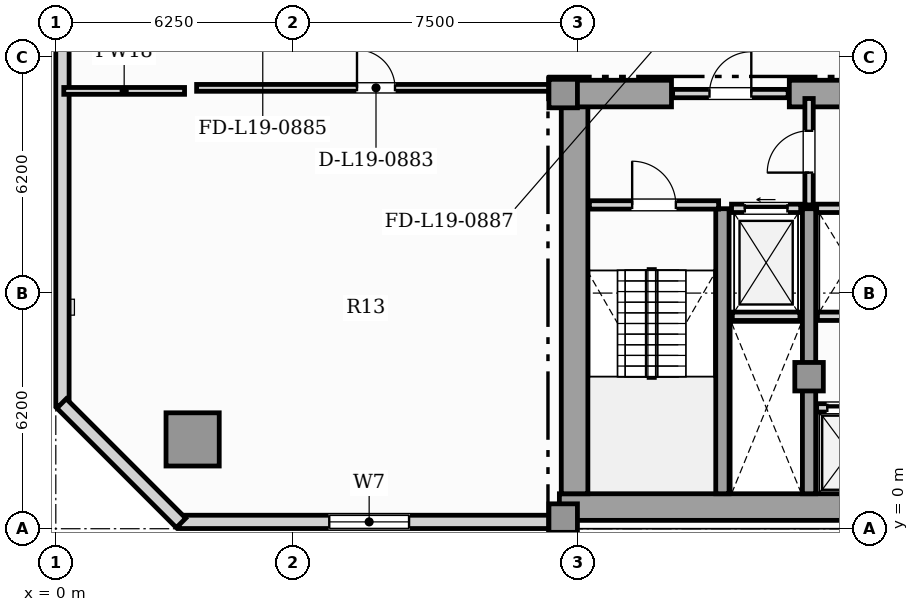
"""IFC4 building model, lengths in metres.
Left out: names, types, materials, properties, quantities, classifications, styles, units other than length and angle.
Written with IfcOpenShell. Run it as: python <this file> out.ifc"""

import sys

from ifc_helpers import new_model, si_unit, direction, frame, frame_2d, origin, origin_2d, place, context, subcontext, project, spatial, rectangle, hollow_rectangle, extrude, element, fill, save


model = new_model("IFC4")
c1 = context("Model", 3, precision=1e-05, world=origin(), true_north=direction((0.0, 1.0)))
c2 = subcontext(c1, "Body", "Model", "MODEL_VIEW")
j1 = project(units=[si_unit("LENGTHUNIT", "METRE"), si_unit("PLANEANGLEUNIT", "RADIAN")], contexts=[c1])
p1 = place(None, origin())
s1 = spatial("IfcSite", under=j1, at=p1, CompositionType="ELEMENT")
p2 = place(p1, origin())
s2 = spatial("IfcBuilding", under=s1, at=p2, CompositionType="ELEMENT")
p3 = place(p2, frame((0.0, 0.0, 81.05)))
s3 = spatial("IfcBuildingStorey", under=s2, at=p3, CompositionType="ELEMENT", Elevation=81.05)
p4 = place(p3, frame((13.25, 0.57, 0.0), z_axis=(0.0, 0.0, 1.0), x_axis=(1.0, 0.0, 0.0)))
e1 = element("IfcWall", 1, at=p4, inside=s3, PredefinedType="SHEAR", context=c2, shape_type="SweptSolid", body=[
    extrude(rectangle(XDim=31.0, YDim=0.7, at=frame_2d((15.5, 0.0))), origin(), (0.0, 0.0, 1.0), 3.6),
])
p5 = place(p3, frame((13.65, 0.92, 0.0), z_axis=(0.0, 0.0, 1.0), x_axis=(0.0, 1.0, 0.0)))
e2 = element("IfcWall", 2, at=p5, inside=s3, PredefinedType="SHEAR", context=c2, shape_type="SweptSolid", body=[
    extrude(rectangle(XDim=10.53, YDim=0.7, at=frame_2d((5.265, 0.0))), origin(), (0.0, 0.0, 1.0), 3.6),
])
p6 = place(p3, frame((13.25, 11.45, 0.0), z_axis=(0.0, 0.0, 1.0), x_axis=(1.0, 0.0, 0.0)))
e3 = element("IfcWall", 3, at=p6, inside=s3, PredefinedType="SHEAR", context=c2, shape_type="SweptSolid", body=[
    extrude(rectangle(XDim=2.95, YDim=0.7, at=frame_2d((1.475, 0.0))), origin(), (0.0, 0.0, 1.0), 3.6),
])
p7 = place(p3, frame((19.3, 11.45, 0.0), z_axis=(0.0, 0.0, 1.0), x_axis=(1.0, 0.0, 0.0)))
e4 = element("IfcWall", 4, at=p7, inside=s3, PredefinedType="SHEAR", context=c2, shape_type="SweptSolid", body=[
    extrude(rectangle(XDim=7.3, YDim=0.7, at=frame_2d((3.65, 0.0))), origin(), (0.0, 0.0, 1.0), 3.6),
])
for number, where, z_axis, x_axis in (
    (5, (17.54, 0.92, 0.0), (0.0, 0.0, 1.0), (0.0, 1.0, 0.0)),
    (6, (19.82, 0.92, 0.0), (0.0, 0.0, 1.0), (0.0, 1.0, 0.0)),
):
    element("IfcWall", number, at=place(p3, frame(where, z_axis=z_axis, x_axis=x_axis)), inside=s3, PredefinedType="SHEAR", context=c2, shape_type="SweptSolid", body=[
        extrude(rectangle(XDim=7.5, YDim=0.35, at=frame_2d((3.75, 0.0))), origin(), (0.0, 0.0, 1.0), 3.6),
    ])
for number, where, z_axis, x_axis in (
    (7, (13.35, 0.28, 0.0), (0.0, 0.0, 1.0), (1.0, 0.0, 0.0)),
    (8, (13.35, 11.45, 0.0), (0.0, 0.0, 1.0), (1.0, 0.0, 0.0)),
    (9, (19.82, 4.0, 0.0), (0.0, 0.0, 1.0), (1.0, 0.0, 0.0)),
):
    element("IfcColumn", number, at=place(p3, frame(where, z_axis=z_axis, x_axis=x_axis)), inside=s3, PredefinedType="COLUMN", context=c2, shape_type="SweptSolid", body=[
        extrude(rectangle(XDim=0.75, YDim=0.75, at=origin_2d()), origin(), (0.0, 0.0, 1.0), 3.85),
    ])
p8 = place(p3, frame((3.6, 2.35, 0.0), z_axis=(0.0, 0.0, 1.0), x_axis=(1.0, 0.0, 0.0)))
e10 = element("IfcColumn", 10, at=p8, inside=s3, PredefinedType="USERDEFINED", context=c2, shape_type="SweptSolid", body=[
    extrude(hollow_rectangle(XDim=1.4, YDim=1.4, WallThickness=0.08, at=origin_2d()), origin(), (0.0, 0.0, 1.0), 3.85),
])
p9 = place(p3, frame((3.24, 0.18, 0.0), z_axis=(0.0, 0.0, 1.0), x_axis=(1.0, 0.0, 0.0)))
e11 = element("IfcWall", 11, at=p9, inside=s3, PredefinedType="SOLIDWALL", context=c2, shape_type="SweptSolid", body=[
    extrude(rectangle(XDim=10.01, YDim=0.35, at=frame_2d((5.005, 0.0))), origin(), (0.0, 0.0, 1.0), 3.6),
])
p10 = place(p9, frame((3.955, 0.0, 0.85)))
e12 = element("IfcOpeningElement", 12, at=p10, cuts=e11, PredefinedType="OPENING", context=c2, shape_type="SweptSolid", body=[
    extrude(rectangle(XDim=2.1, YDim=2.05, at=frame_2d((1.05, 1.025))), frame((0.0, 0.185, 0.0), z_axis=(0.0, -1.0, 0.0), x_axis=(1.0, 0.0, 0.0)), (0.0, 0.0, 1.0), 0.37),
])
p11 = place(p3, frame((0.175, 43.16, 0.0), z_axis=(0.0, 0.0, 1.0), x_axis=(0.0, -1.0, 0.0)))
e13 = element("IfcWall", 13, at=p11, inside=s3, PredefinedType="SOLIDWALL", context=c2, shape_type="SweptSolid", body=[
    extrude(rectangle(XDim=39.92, YDim=0.35, at=frame_2d((19.96, 0.0))), origin(), (0.0, 0.0, 1.0), 3.6),
])
p12 = place(p11, frame((3.34, 0.0, 0.95)))
e14 = element("IfcOpeningElement", 14, at=p12, cuts=e13, PredefinedType="OPENING", context=c2, shape_type="SweptSolid", body=[
    extrude(rectangle(XDim=0.9, YDim=1.5, at=frame_2d((0.45, 0.75))), frame((0.0, 0.185, 0.0), z_axis=(0.0, -1.0, 0.0), x_axis=(1.0, 0.0, 0.0)), (0.0, 0.0, 1.0), 0.37),
])
p13 = place(p11, frame((23.517, 0.0, 0.9)))
e15 = element("IfcOpeningElement", 15, at=p13, cuts=e13, PredefinedType="OPENING", context=c2, shape_type="SweptSolid", body=[
    extrude(rectangle(XDim=1.5, YDim=1.95, at=frame_2d((0.75, 0.975))), frame((0.0, 0.185, 0.0), z_axis=(0.0, -1.0, 0.0), x_axis=(1.0, 0.0, 0.0)), (0.0, 0.0, 1.0), 0.37),
])
p14 = place(p11, frame((12.587, 0.0, 0.9)))
e16 = element("IfcOpeningElement", 16, at=p14, cuts=e13, PredefinedType="OPENING", context=c2, shape_type="SweptSolid", body=[
    extrude(rectangle(XDim=1.5, YDim=1.95, at=frame_2d((0.75, 0.975))), frame((0.0, 0.185, 0.0), z_axis=(0.0, -1.0, 0.0), x_axis=(1.0, 0.0, 0.0)), (0.0, 0.0, 1.0), 0.37),
])
p15 = place(p3, frame((0.152, 3.295, 0.0), z_axis=(0.0, 0.0, 1.0), x_axis=(0.707106781187, -0.707106781187, 0.0)))
e17 = element("IfcWall", 17, at=p15, inside=s3, PredefinedType="SOLIDWALL", context=c2, shape_type="SweptSolid", body=[
    extrude(rectangle(XDim=4.445, YDim=0.35, at=frame_2d((2.223, 0.0))), origin(), (0.0, 0.0, 1.0), 3.6),
])
p16 = place(p3, frame((17.8, 5.59, 0.0), z_axis=(0.0, 0.0, 1.0), x_axis=(1.0, 0.0, 0.0)))
e18 = element("IfcWall", 18, at=p16, inside=s3, PredefinedType="SOLIDWALL", context=c2, shape_type="SweptSolid", body=[
    extrude(rectangle(XDim=1.78, YDim=0.22, at=frame_2d((0.89, 0.0))), origin(), (0.0, 0.0, 1.0), 3.6),
])
p17 = place(p3, frame((17.78, 8.43, 0.0), z_axis=(0.0, 0.0, 1.0), x_axis=(1.0, 0.0, 0.0)))
e19 = element("IfcWall", 19, at=p17, inside=s3, PredefinedType="SOLIDWALL", context=c2, shape_type="SweptSolid", body=[
    extrude(rectangle(XDim=1.82, YDim=0.22, at=frame_2d((0.91, 0.0))), origin(), (0.0, 0.0, 1.0), 3.6),
])
p18 = place(p17, frame((0.35, 0.0, 0.0)))
e20 = element("IfcOpeningElement", 20, at=p18, cuts=e19, PredefinedType="OPENING", context=c2, shape_type="SweptSolid", body=[
    extrude(rectangle(XDim=1.12, YDim=2.25, at=frame_2d((0.56, 1.125))), frame((0.0, 0.12, 0.0), z_axis=(0.0, -1.0, 0.0), x_axis=(1.0, 0.0, 0.0)), (0.0, 0.0, 1.0), 0.24),
])
p19 = place(p3, frame((20.02, 3.18, 0.0), z_axis=(0.0, 0.0, 1.0), x_axis=(1.0, 0.0, 0.0)))
e21 = element("IfcWall", 21, at=p19, inside=s3, PredefinedType="SOLIDWALL", context=c2, shape_type="SweptSolid", body=[
    extrude(rectangle(XDim=1.74, YDim=0.22, at=frame_2d((0.87, 0.0))), origin(), (0.0, 0.0, 1.0), 3.6),
])
p20 = place(p19, frame((0.28, 0.0, 0.0)))
e22 = element("IfcOpeningElement", 22, at=p20, cuts=e21, PredefinedType="OPENING", context=c2, shape_type="SweptSolid", body=[
    extrude(rectangle(XDim=1.18, YDim=2.2, at=frame_2d((0.59, 1.1))), frame((0.0, 0.12, 0.0), z_axis=(0.0, -1.0, 0.0), x_axis=(1.0, 0.0, 0.0)), (0.0, 0.0, 1.0), 0.24),
])
p21 = place(p3, frame((20.04, 5.59, 0.0), z_axis=(0.0, 0.0, 1.0), x_axis=(1.0, 0.0, 0.0)))
e23 = element("IfcWall", 23, at=p21, inside=s3, PredefinedType="SOLIDWALL", context=c2, shape_type="SweptSolid", body=[
    extrude(rectangle(XDim=1.7, YDim=0.22, at=frame_2d((0.85, 0.0))), origin(), (0.0, 0.0, 1.0), 3.6),
])
p22 = place(p3, frame((20.02, 8.43, 0.0), z_axis=(0.0, 0.0, 1.0), x_axis=(1.0, 0.0, 0.0)))
e24 = element("IfcWall", 24, at=p22, inside=s3, PredefinedType="SOLIDWALL", context=c2, shape_type="SweptSolid", body=[
    extrude(rectangle(XDim=1.74, YDim=0.22, at=frame_2d((0.87, 0.0))), origin(), (0.0, 0.0, 1.0), 3.6),
])
p23 = place(p3, frame((14.04, 8.52, 0.0), z_axis=(0.0, 0.0, 1.0), x_axis=(1.0, 0.0, 0.0)))
e25 = element("IfcWall", 25, at=p23, inside=s3, PredefinedType="SOLIDWALL", context=c2, shape_type="SweptSolid", body=[
    extrude(rectangle(XDim=3.4, YDim=0.22, at=frame_2d((1.7, 0.0))), origin(), (0.0, 0.0, 1.0), 3.6),
])
p24 = place(p23, frame((1.125, 0.0, 0.0)))
e26 = element("IfcOpeningElement", 26, at=p24, cuts=e25, PredefinedType="OPENING", context=c2, shape_type="SweptSolid", body=[
    extrude(rectangle(XDim=1.15, YDim=2.2, at=frame_2d((0.575, 1.1))), frame((0.0, 0.12, 0.0), z_axis=(0.0, -1.0, 0.0), x_axis=(1.0, 0.0, 0.0)), (0.0, 0.0, 1.0), 0.24),
])
p25 = place(p3, frame((19.82, 8.52, 0.0), z_axis=(0.0, 0.0, 1.0), x_axis=(0.0, 1.0, 0.0)))
e27 = element("IfcWall", 27, at=p25, inside=s3, PredefinedType="SOLIDWALL", context=c2, shape_type="SweptSolid", body=[
    extrude(rectangle(XDim=2.8, YDim=0.22, at=frame_2d((1.4, 0.0))), origin(), (0.0, 0.0, 1.0), 3.055),
])
p26 = place(p25, frame((0.85, 0.0, 0.0)))
e28 = element("IfcOpeningElement", 28, at=p26, cuts=e27, PredefinedType="OPENING", context=c2, shape_type="SweptSolid", body=[
    extrude(rectangle(XDim=1.1, YDim=2.2, at=frame_2d((0.55, 1.1))), frame((0.0, 0.12, 0.0), z_axis=(0.0, -1.0, 0.0), x_axis=(1.0, 0.0, 0.0)), (0.0, 0.0, 1.0), 0.24),
])
p27 = place(p3, frame((16.23, 11.45, 0.0), z_axis=(0.0, 0.0, 1.0), x_axis=(1.0, 0.0, 0.0)))
e29 = element("IfcWall", 29, at=p27, inside=s3, PredefinedType="SOLIDWALL", context=c2, shape_type="SweptSolid", body=[
    extrude(rectangle(XDim=3.04, YDim=0.22, at=frame_2d((1.52, 0.0))), origin(), (0.0, 0.0, 1.0), 3.6),
])
p28 = place(p27, frame((0.97, 0.0, 0.0)))
e30 = element("IfcOpeningElement", 30, at=p28, cuts=e29, PredefinedType="OPENING", context=c2, shape_type="SweptSolid", body=[
    extrude(rectangle(XDim=1.1, YDim=2.2, at=frame_2d((0.55, 1.1))), frame((0.0, 0.12, 0.0), z_axis=(0.0, -1.0, 0.0), x_axis=(1.0, 0.0, 0.0)), (0.0, 0.0, 1.0), 0.24),
])
p29 = place(p3, frame((3.705, 11.6, 0.0), z_axis=(0.0, 0.0, 1.0), x_axis=(1.0, 0.0, 0.0)))
e31 = element("IfcWall", 31, at=p29, inside=s3, PredefinedType="PARTITIONING", context=c2, shape_type="SweptSolid", body=[
    extrude(rectangle(XDim=9.44, YDim=0.18, at=frame_2d((4.72, 0.0))), origin(), (0.0, 0.0, 1.0), 3.6),
])
p30 = place(p29, frame((4.22, 0.0, 0.0)))
e32 = element("IfcOpeningElement", 32, at=p30, cuts=e31, PredefinedType="OPENING", context=c2, shape_type="SweptSolid", body=[
    extrude(rectangle(XDim=1.0, YDim=2.15, at=frame_2d((0.5, 1.075))), frame((0.0, 0.1, 0.0), z_axis=(0.0, -1.0, 0.0), x_axis=(1.0, 0.0, 0.0)), (0.0, 0.0, 1.0), 0.2),
])
p31 = place(p3, frame((0.21, 11.52, 0.0), z_axis=(0.0, 0.0, 1.0), x_axis=(1.0, 0.0, 0.0)))
e33 = element("IfcWall", 33, at=p31, inside=s3, PredefinedType="PARTITIONING", context=c2, shape_type="SweptSolid", body=[
    extrude(rectangle(XDim=3.178, YDim=0.18, at=frame_2d((1.589, 0.0))), origin(), (0.0, 0.0, 1.0), 3.6),
])
p32 = place(p10, origin())
e34 = element("IfcWindow", 34, at=p32, inside=s3, PartitioningType="SINGLE_PANEL", PredefinedType="WINDOW", context=c2, shape_type="SweptSolid", body=[
    extrude(rectangle(XDim=2.1, YDim=2.05, at=frame_2d((1.05, 1.025))), frame((0.0, 0.03, 0.0), z_axis=(0.0, -1.0, 0.0), x_axis=(1.0, 0.0, 0.0)), (0.0, 0.0, 1.0), 0.06),
])
fill(e12, e34)
p33 = place(p18, origin())
e35 = element("IfcDoor", 35, at=p33, inside=s3, OperationType="SLIDING_TO_LEFT", PredefinedType="DOOR", context=c2, shape_type="SweptSolid", body=[
    extrude(rectangle(XDim=1.12, YDim=2.25, at=frame_2d((0.56, 1.125))), frame((0.0, 0.025, 0.0), z_axis=(0.0, -1.0, 0.0), x_axis=(1.0, 0.0, 0.0)), (0.0, 0.0, 1.0), 0.05),
])
fill(e20, e35)
p34 = place(p20, origin())
e36 = element("IfcDoor", 36, at=p34, inside=s3, OperationType="SLIDING_TO_RIGHT", PredefinedType="DOOR", context=c2, shape_type="SweptSolid", body=[
    extrude(rectangle(XDim=1.18, YDim=2.2, at=frame_2d((0.59, 1.1))), frame((0.0, 0.025, 0.0), z_axis=(0.0, -1.0, 0.0), x_axis=(1.0, 0.0, 0.0)), (0.0, 0.0, 1.0), 0.05),
])
fill(e22, e36)
p35 = place(p24, origin())
e37 = element("IfcDoor", 37, at=p35, inside=s3, OperationType="SINGLE_SWING_LEFT", PredefinedType="DOOR", context=c2, shape_type="SweptSolid", body=[
    extrude(rectangle(XDim=1.15, YDim=2.2, at=frame_2d((0.575, 1.1))), frame((0.0, 0.025, 0.0), z_axis=(0.0, -1.0, 0.0), x_axis=(1.0, 0.0, 0.0)), (0.0, 0.0, 1.0), 0.05),
])
fill(e26, e37)
p36 = place(p26, origin())
e38 = element("IfcDoor", 38, at=p36, inside=s3, OperationType="SINGLE_SWING_LEFT", PredefinedType="DOOR", context=c2, shape_type="SweptSolid", body=[
    extrude(rectangle(XDim=1.1, YDim=2.2, at=frame_2d((0.55, 1.1))), frame((0.0, 0.025, 0.0), z_axis=(0.0, -1.0, 0.0), x_axis=(1.0, 0.0, 0.0)), (0.0, 0.0, 1.0), 0.05),
])
fill(e28, e38)
p37 = place(p28, origin())
e39 = element("IfcDoor", 39, at=p37, inside=s3, OperationType="SINGLE_SWING_RIGHT", PredefinedType="DOOR", context=c2, shape_type="SweptSolid", body=[
    extrude(rectangle(XDim=1.1, YDim=2.2, at=frame_2d((0.55, 1.1))), frame((0.0, 0.025, 0.0), z_axis=(0.0, -1.0, 0.0), x_axis=(1.0, 0.0, 0.0)), (0.0, 0.0, 1.0), 0.05),
])
fill(e30, e39)
p38 = place(p30, origin())
e40 = element("IfcDoor", 40, at=p38, inside=s3, OperationType="SINGLE_SWING_LEFT", PredefinedType="DOOR", context=c2, shape_type="SweptSolid", body=[
    extrude(rectangle(XDim=1.0, YDim=2.15, at=frame_2d((0.5, 1.075))), frame((0.0, 0.025, 0.0), z_axis=(0.0, -1.0, 0.0), x_axis=(1.0, 0.0, 0.0)), (0.0, 0.0, 1.0), 0.05),
])
fill(e32, e40)
save(model, sys.argv[1])
